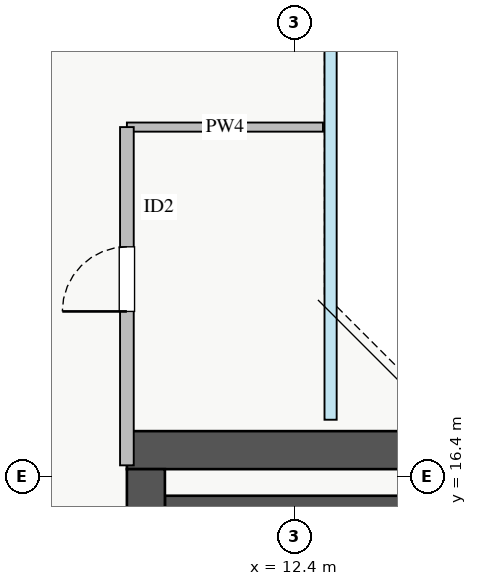
"""IFC4 building model, lengths in metres.
Left out: names, types, materials, properties, quantities, classifications, styles, units other than length and angle.
Written with IfcOpenShell. Run it as: python <this file> out.ifc"""

import sys

from ifc_helpers import new_model, si_unit, direction, frame, frame_2d, origin, place, context, subcontext, project, spatial, rectangle, extrude, source, transform, mapped, element, fill, save


model = new_model("IFC4")
c1 = context("Model", 3, precision=1e-05, world=origin(), true_north=direction((0.0, 1.0)))
c2 = subcontext(c1, "Body", "Model", "MODEL_VIEW")
j1 = project(units=[si_unit("LENGTHUNIT", "METRE"), si_unit("PLANEANGLEUNIT", "RADIAN")], contexts=[c1])
p1 = place(None, origin())
s1 = spatial("IfcSite", under=j1, at=p1, CompositionType="ELEMENT")
p2 = place(p1, origin())
s2 = spatial("IfcBuilding", under=s1, at=p2, CompositionType="ELEMENT")
p3 = place(p2, frame((0.0, 0.0, 229.5)))
s3 = spatial("IfcBuildingStorey", under=s2, at=p3, CompositionType="ELEMENT", Elevation=229.5)
p4 = place(p3, frame((10.7, 16.05, 0.0), z_axis=(0.0, 0.0, 1.0), x_axis=(1.0, 0.0, 0.0)))
e1 = element("IfcWall", 1, at=p4, inside=s3, PredefinedType="SHEAR", context=c2, shape_type="SweptSolid", body=[
    extrude(rectangle(XDim=7.45, YDim=0.2, at=frame_2d((3.725, 0.0))), origin(), (0.0, 0.0, 1.0), 3.25),
])
p5 = place(p3, frame((10.2, 16.75, 0.0), z_axis=(0.0, 0.0, 1.0), x_axis=(1.0, 0.0, 0.0)))
e2 = element("IfcWall", 2, at=p5, inside=s3, PredefinedType="SHEAR", context=c2, shape_type="SweptSolid", body=[
    extrude(rectangle(XDim=17.6, YDim=0.5, at=frame_2d((8.8, 0.0))), origin(), (0.0, 0.0, 1.0), 3.25),
])
p6 = place(p3, frame((10.45, 10.3, 0.0), z_axis=(0.0, 0.0, 1.0), x_axis=(0.0, 1.0, 0.0)))
e3 = element("IfcWall", 3, at=p6, inside=s3, PredefinedType="SHEAR", context=c2, shape_type="SweptSolid", body=[
    extrude(rectangle(XDim=6.2, YDim=0.5, at=frame_2d((3.1, 0.0))), origin(), (0.0, 0.0, 1.0), 3.25),
])
p7 = place(p3, frame((10.2, 21.0, 0.0), z_axis=(0.0, 0.0, 1.0), x_axis=(1.0, 0.0, 0.0)))
e4 = element("IfcWall", 4, at=p7, inside=s3, PredefinedType="PLUMBINGWALL", context=c2, shape_type="SweptSolid", body=[
    extrude(rectangle(XDim=2.58, YDim=0.12, at=frame_2d((1.29, 0.0))), origin(), (0.0, 0.0, 1.0), 3.03),
])
p8 = place(p3, frame((10.2, 16.55, 0.0), z_axis=(0.0, 0.0, 1.0), x_axis=(0.0, 1.0, 0.0)))
e5 = element("IfcWall", 5, at=p8, inside=s3, PredefinedType="PARTITIONING", context=c2, shape_type="SweptSolid", body=[
    extrude(rectangle(XDim=4.45, YDim=0.18, at=frame_2d((2.225, 0.0))), origin(), (0.0, 0.0, 1.0), 3.03),
])
p9 = place(p8, frame((2.025, 0.0, 0.0)))
e6 = element("IfcOpeningElement", 6, at=p9, cuts=e5, PredefinedType="OPENING", context=c2, shape_type="SweptSolid", body=[
    extrude(rectangle(XDim=0.85, YDim=2.05, at=frame_2d((0.425, 1.025))), frame((0.0, 0.1, 0.0), z_axis=(0.0, -1.0, 0.0), x_axis=(1.0, 0.0, 0.0)), (0.0, 0.0, 1.0), 0.2),
])
m1 = source(origin(), c2, "Body", "SweptSolid", [
    extrude(rectangle(XDim=0.85, YDim=2.05, at=frame_2d((0.425, 1.025))), frame((0.0, 0.025, 0.0), z_axis=(0.0, -1.0, 0.0), x_axis=(1.0, 0.0, 0.0)), (0.0, 0.0, 1.0), 0.05),
])
p10 = place(p9, origin())
e7 = element("IfcDoor", 7, at=p10, inside=s3, OperationType="SINGLE_SWING_LEFT", PredefinedType="DOOR", context=c2, shape_type="MappedRepresentation", body=[
    mapped(m1, transform((0.0, 0.0, 0.0), x_axis=(1.0, 0.0, 0.0), y_axis=(0.0, 1.0, 0.0), z_axis=(0.0, 0.0, 1.0), scale=1.0)),
])
fill(e6, e7)
save(model, sys.argv[1])
